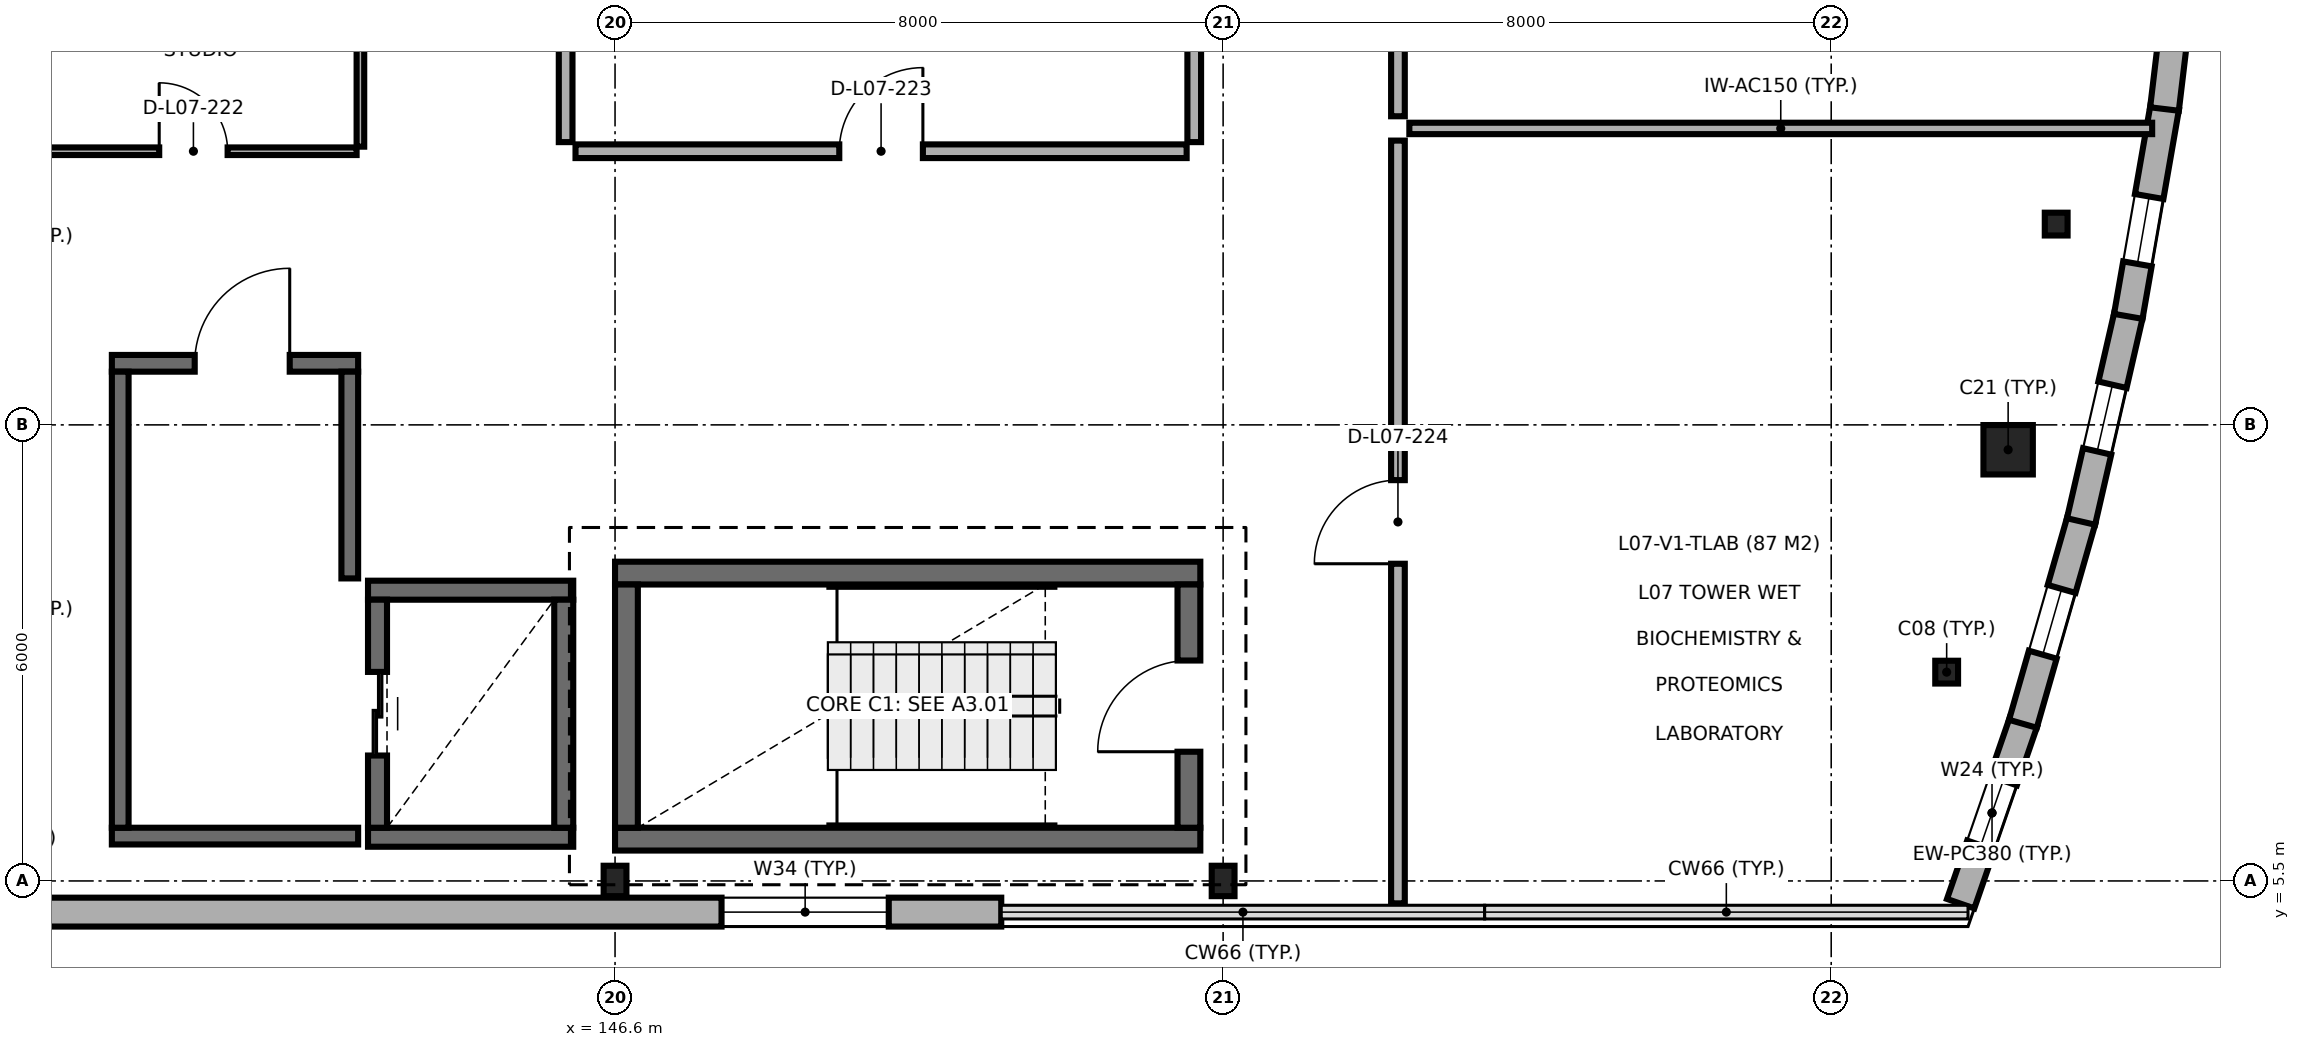
"""IFC4 building model, lengths in metres.
Left out: names, types, materials, properties, quantities, classifications, styles, units other than length and angle.
Written with IfcOpenShell. Run it as: python <this file> out.ifc"""

import sys

from ifc_helpers import new_model, si_unit, direction, frame, frame_2d, origin, origin_2d, place, context, subcontext, project, spatial, rectangle, circle, i_section, extrude, element, fill, save


model = new_model("IFC4")
c1 = context("Model", 3, precision=1e-05, world=origin(), true_north=direction((0.0, 1.0)))
c2 = subcontext(c1, "Body", "Model", "MODEL_VIEW")
j1 = project(units=[si_unit("LENGTHUNIT", "METRE"), si_unit("PLANEANGLEUNIT", "RADIAN")], contexts=[c1])
p1 = place(None, origin())
s1 = spatial("IfcSite", under=j1, at=p1, CompositionType="ELEMENT")
p2 = place(p1, origin())
s2 = spatial("IfcBuilding", under=s1, at=p2, CompositionType="ELEMENT")
p3 = place(p2, frame((0.0, 0.0, 30.6)))
s3 = spatial("IfcBuildingStorey", under=s2, at=p3, CompositionType="ELEMENT", Elevation=30.6)
for number, where, z_axis, x_axis in (
    (1, (146.6, 5.5, 0.0), (0.0, 0.0, 1.0), (1.0, 0.0, 0.0)),
    (2, (154.6, 5.5, 0.0), (0.0, 0.0, 1.0), (1.0, 0.0, 0.0)),
):
    element("IfcColumn", number, at=place(p3, frame(where, z_axis=z_axis, x_axis=x_axis)), inside=s3, PredefinedType="COLUMN", context=c2, shape_type="SweptSolid", body=[
        extrude(i_section(OverallWidth=0.3, OverallDepth=0.4, WebThickness=0.013, FlangeThickness=0.024, FilletRadius=0.027, at=origin_2d()), origin(), (0.0, 0.0, 1.0), 3.9),
    ])
p4 = place(p3, frame((164.119, 8.247, 0.0), z_axis=(0.0, 0.0, 1.0), x_axis=(1.0, 0.0, 0.0)))
e3 = element("IfcColumn", 3, at=p4, inside=s3, PredefinedType="COLUMN", context=c2, shape_type="SweptSolid", body=[
    extrude(i_section(OverallWidth=0.3, OverallDepth=0.3, WebThickness=0.011, FlangeThickness=0.019, FilletRadius=0.027, at=origin_2d()), origin(), (0.0, 0.0, 1.0), 3.9),
])
p5 = place(p3, frame((164.928, 11.173, 0.0), z_axis=(0.0, 0.0, 1.0), x_axis=(1.0, 0.0, 0.0)))
e4 = element("IfcColumn", 4, at=p5, inside=s3, PredefinedType="COLUMN", context=c2, shape_type="SweptSolid", body=[
    extrude(circle(Radius=0.325, at=origin_2d()), origin(), (0.0, 0.0, 1.0), 3.9),
])
p6 = place(p3, frame((165.56, 14.142, 0.0), z_axis=(0.0, 0.0, 1.0), x_axis=(1.0, 0.0, 0.0)))
e5 = element("IfcColumn", 5, at=p6, inside=s3, PredefinedType="COLUMN", context=c2, shape_type="SweptSolid", body=[
    extrude(i_section(OverallWidth=0.3, OverallDepth=0.3, WebThickness=0.011, FlangeThickness=0.019, FilletRadius=0.027, at=origin_2d()), origin(), (0.0, 0.0, 1.0), 3.9),
])
for number, where, z_axis, x_axis in (
    (6, (146.6, 6.05, 0.0), (0.0, 0.0, 1.0), (1.0, 0.0, 0.0)),
    (7, (154.3, 9.55, 0.0), (0.0, 0.0, 1.0), (-1.0, 0.0, 0.0)),
):
    element("IfcWall", number, at=place(p3, frame(where, z_axis=z_axis, x_axis=x_axis)), inside=s3, PredefinedType="SHEAR", context=c2, shape_type="SweptSolid", body=[
        extrude(rectangle(XDim=7.7, YDim=0.3, at=frame_2d((3.85, 0.0))), origin(), (0.0, 0.0, 1.0), 3.9),
    ])
p7 = place(p3, frame((146.75, 9.4, 0.0), z_axis=(0.0, 0.0, 1.0), x_axis=(0.0, -1.0, 0.0)))
e8 = element("IfcWall", 8, at=p7, inside=s3, PredefinedType="SHEAR", context=c2, shape_type="SweptSolid", body=[
    extrude(rectangle(XDim=3.2, YDim=0.3, at=frame_2d((1.6, 0.0))), origin(), (0.0, 0.0, 1.0), 3.9),
])
p8 = place(p3, frame((154.15, 6.2, 0.0), z_axis=(0.0, 0.0, 1.0), x_axis=(0.0, 1.0, 0.0)))
e9 = element("IfcWall", 9, at=p8, inside=s3, PredefinedType="SHEAR", context=c2, shape_type="SweptSolid", body=[
    extrude(rectangle(XDim=3.2, YDim=0.3, at=frame_2d((1.6, 0.0))), origin(), (0.0, 0.0, 1.0), 3.9),
])
p9 = place(p8, frame((1.0, 0.0, 0.0)))
e10 = element("IfcOpeningElement", 10, at=p9, cuts=e9, PredefinedType="OPENING", context=c2, shape_type="SweptSolid", body=[
    extrude(rectangle(XDim=1.2, YDim=2.15, at=frame_2d((0.6, 1.075))), frame((0.0, 0.16, 0.0), z_axis=(0.0, -1.0, 0.0), x_axis=(1.0, 0.0, 0.0)), (0.0, 0.0, 1.0), 0.32),
])
for number, where, z_axis, x_axis in (
    (11, (143.35, 6.075, 0.0), (0.0, 0.0, 1.0), (1.0, 0.0, 0.0)),
    (12, (146.05, 9.325, 0.0), (0.0, 0.0, 1.0), (-1.0, 0.0, 0.0)),
):
    element("IfcWall", number, at=place(p3, frame(where, z_axis=z_axis, x_axis=x_axis)), inside=s3, PredefinedType="SHEAR", context=c2, shape_type="SweptSolid", body=[
        extrude(rectangle(XDim=2.7, YDim=0.25, at=frame_2d((1.35, 0.0))), origin(), (0.0, 0.0, 1.0), 3.9),
    ])
p10 = place(p3, frame((143.475, 9.2, 0.0), z_axis=(0.0, 0.0, 1.0), x_axis=(0.0, -1.0, 0.0)))
e13 = element("IfcWall", 13, at=p10, inside=s3, PredefinedType="SHEAR", context=c2, shape_type="SweptSolid", body=[
    extrude(rectangle(XDim=3.0, YDim=0.25, at=frame_2d((1.5, 0.0))), origin(), (0.0, 0.0, 1.0), 3.9),
])
p11 = place(p10, frame((0.95, 0.0, 0.0)))
e14 = element("IfcOpeningElement", 14, at=p11, cuts=e13, PredefinedType="OPENING", context=c2, shape_type="SweptSolid", body=[
    extrude(rectangle(XDim=1.1, YDim=2.15, at=frame_2d((0.55, 1.075))), frame((0.0, 0.135, 0.0), z_axis=(0.0, -1.0, 0.0), x_axis=(1.0, 0.0, 0.0)), (0.0, 0.0, 1.0), 0.27),
])
p12 = place(p3, frame((145.925, 6.2, 0.0), z_axis=(0.0, 0.0, 1.0), x_axis=(0.0, 1.0, 0.0)))
e15 = element("IfcWall", 15, at=p12, inside=s3, PredefinedType="SHEAR", context=c2, shape_type="SweptSolid", body=[
    extrude(rectangle(XDim=3.0, YDim=0.25, at=frame_2d((1.5, 0.0))), origin(), (0.0, 0.0, 1.0), 3.9),
])
p13 = place(p3, frame((139.98, 6.09, 0.0), z_axis=(0.0, 0.0, 1.0), x_axis=(1.0, 0.0, 0.0)))
e16 = element("IfcWall", 16, at=p13, inside=s3, PredefinedType="SOLIDWALL", context=c2, shape_type="SweptSolid", body=[
    extrude(rectangle(XDim=3.24, YDim=0.22, at=frame_2d((1.62, 0.0))), origin(), (0.0, 0.0, 1.0), 3.7),
])
p14 = place(p3, frame((143.22, 12.31, 0.0), z_axis=(0.0, 0.0, 1.0), x_axis=(-1.0, 0.0, 0.0)))
e17 = element("IfcWall", 17, at=p14, inside=s3, PredefinedType="SOLIDWALL", context=c2, shape_type="SweptSolid", body=[
    extrude(rectangle(XDim=3.24, YDim=0.22, at=frame_2d((1.62, 0.0))), origin(), (0.0, 0.0, 1.0), 3.7),
])
p15 = place(p14, frame((0.9, 0.0, 0.0)))
e18 = element("IfcOpeningElement", 18, at=p15, cuts=e17, PredefinedType="OPENING", context=c2, shape_type="SweptSolid", body=[
    extrude(rectangle(XDim=1.25, YDim=2.15, at=frame_2d((0.625, 1.075))), frame((0.0, 0.12, 0.0), z_axis=(0.0, -1.0, 0.0), x_axis=(1.0, 0.0, 0.0)), (0.0, 0.0, 1.0), 0.24),
])
p16 = place(p3, frame((140.09, 12.2, 0.0), z_axis=(0.0, 0.0, 1.0), x_axis=(0.0, -1.0, 0.0)))
e19 = element("IfcWall", 19, at=p16, inside=s3, PredefinedType="SOLIDWALL", context=c2, shape_type="SweptSolid", body=[
    extrude(rectangle(XDim=6.0, YDim=0.22, at=frame_2d((3.0, 0.0))), origin(), (0.0, 0.0, 1.0), 3.7),
])
p17 = place(p3, frame((143.11, 9.48, 0.0), z_axis=(0.0, 0.0, 1.0), x_axis=(0.0, 1.0, 0.0)))
e20 = element("IfcWall", 20, at=p17, inside=s3, PredefinedType="SOLIDWALL", context=c2, shape_type="SweptSolid", body=[
    extrude(rectangle(XDim=2.72, YDim=0.22, at=frame_2d((1.36, 0.0))), origin(), (0.0, 0.0, 1.0), 3.7),
])
p18 = place(p3, frame((138.962, 5.09, 0.0), z_axis=(0.0, 0.0, 1.0), x_axis=(1.0, 0.0, 0.0)))
e21 = element("IfcWall", 21, at=p18, inside=s3, PredefinedType="SOLIDWALL", context=c2, shape_type="SweptSolid", body=[
    extrude(rectangle(XDim=12.719, YDim=0.38, at=frame_2d((6.359, 0.0))), origin(), (0.0, 0.0, 1.0), 3.7),
])
p19 = place(p18, frame((9.039, 0.0, 0.9)))
e22 = element("IfcOpeningElement", 22, at=p19, cuts=e21, PredefinedType="OPENING", context=c2, shape_type="SweptSolid", body=[
    extrude(rectangle(XDim=2.2, YDim=1.65, at=frame_2d((1.1, 0.825))), frame((0.0, 0.2, 0.0), z_axis=(0.0, -1.0, 0.0), x_axis=(1.0, 0.0, 0.0)), (0.0, 0.0, 1.0), 0.4),
])
p20 = place(p3, frame((164.303, 5.201, 0.0), z_axis=(0.0, 0.0, 1.0), x_axis=(0.3268184741, 0.945087130897, 0.0)))
e23 = element("IfcWall", 23, at=p20, inside=s3, PredefinedType="SOLIDWALL", context=c2, shape_type="SweptSolid", body=[
    extrude(rectangle(XDim=2.526, YDim=0.38, at=frame_2d((1.263, 0.0))), origin(), (0.0, 0.0, 1.0), 3.7),
])
p21 = place(p20, frame((0.813, 0.0, 0.9)))
e24 = element("IfcOpeningElement", 24, at=p21, cuts=e23, PredefinedType="OPENING", context=c2, shape_type="SweptSolid", body=[
    extrude(rectangle(XDim=0.9, YDim=1.8, at=frame_2d((0.45, 0.9))), frame((0.0, 0.2, 0.0), z_axis=(0.0, -1.0, 0.0), x_axis=(1.0, 0.0, 0.0)), (0.0, 0.0, 1.0), 0.4),
])
p22 = place(p3, frame((165.122, 7.567, 0.0), z_axis=(0.0, 0.0, 1.0), x_axis=(0.275772175055, 0.961223026912, 0.0)))
e25 = element("IfcWall", 25, at=p22, inside=s3, PredefinedType="SOLIDWALL", context=c2, shape_type="SweptSolid", body=[
    extrude(rectangle(XDim=2.791, YDim=0.38, at=frame_2d((1.396, 0.0))), origin(), (0.0, 0.0, 1.0), 3.7),
])
p23 = place(p22, frame((0.946, 0.0, 0.9)))
e26 = element("IfcOpeningElement", 26, at=p23, cuts=e25, PredefinedType="OPENING", context=c2, shape_type="SweptSolid", body=[
    extrude(rectangle(XDim=0.9, YDim=1.8, at=frame_2d((0.45, 0.9))), frame((0.0, 0.2, 0.0), z_axis=(0.0, -1.0, 0.0), x_axis=(1.0, 0.0, 0.0)), (0.0, 0.0, 1.0), 0.4),
])
p24 = place(p3, frame((165.887, 10.229, 0.0), z_axis=(0.0, 0.0, 1.0), x_axis=(0.224009786197, 0.974586894888, 0.0)))
e27 = element("IfcWall", 27, at=p24, inside=s3, PredefinedType="SOLIDWALL", context=c2, shape_type="SweptSolid", body=[
    extrude(rectangle(XDim=2.791, YDim=0.38, at=frame_2d((1.396, 0.0))), origin(), (0.0, 0.0, 1.0), 3.7),
])
p25 = place(p24, frame((0.946, 0.0, 0.9)))
e28 = element("IfcOpeningElement", 28, at=p25, cuts=e27, PredefinedType="OPENING", context=c2, shape_type="SweptSolid", body=[
    extrude(rectangle(XDim=0.9, YDim=1.8, at=frame_2d((0.45, 0.9))), frame((0.0, 0.2, 0.0), z_axis=(0.0, -1.0, 0.0), x_axis=(1.0, 0.0, 0.0)), (0.0, 0.0, 1.0), 0.4),
])
p26 = place(p3, frame((166.508, 12.927, 0.0), z_axis=(0.0, 0.0, 1.0), x_axis=(0.171699219546, 0.985149419128, 0.0)))
e29 = element("IfcWall", 29, at=p26, inside=s3, PredefinedType="SOLIDWALL", context=c2, shape_type="SweptSolid", body=[
    extrude(rectangle(XDim=2.791, YDim=0.38, at=frame_2d((1.396, 0.0))), origin(), (0.0, 0.0, 1.0), 3.7),
])
p27 = place(p26, frame((0.701, 0.0, 0.9)))
e30 = element("IfcOpeningElement", 30, at=p27, cuts=e29, PredefinedType="OPENING", context=c2, shape_type="SweptSolid", body=[
    extrude(rectangle(XDim=0.9, YDim=1.8, at=frame_2d((0.45, 0.9))), frame((0.0, 0.2, 0.0), z_axis=(0.0, -1.0, 0.0), x_axis=(1.0, 0.0, 0.0)), (0.0, 0.0, 1.0), 0.4),
])
p28 = place(p3, frame((166.985, 15.655, 0.0), z_axis=(0.0, 0.0, 1.0), x_axis=(0.118779618782, 0.992920642429, 0.0)))
e31 = element("IfcWall", 31, at=p28, inside=s3, PredefinedType="SOLIDWALL", context=c2, shape_type="SweptSolid", body=[
    extrude(rectangle(XDim=2.791, YDim=0.38, at=frame_2d((1.396, 0.0))), origin(), (0.0, 0.0, 1.0), 3.7),
])
p29 = place(p28, frame((0.946, 0.0, 0.9)))
e32 = element("IfcOpeningElement", 32, at=p29, cuts=e31, PredefinedType="OPENING", context=c2, shape_type="SweptSolid", body=[
    extrude(rectangle(XDim=0.9, YDim=1.8, at=frame_2d((0.45, 0.9))), frame((0.0, 0.2, 0.0), z_axis=(0.0, -1.0, 0.0), x_axis=(1.0, 0.0, 0.0)), (0.0, 0.0, 1.0), 0.4),
])
p30 = place(p3, frame((143.25, 15.16, 0.0), z_axis=(0.0, 0.0, 1.0), x_axis=(0.0, 1.0, 0.0)))
e33 = element("IfcWall", 33, at=p30, inside=s3, PredefinedType="PARTITIONING", context=c2, shape_type="SweptSolid", body=[
    extrude(rectangle(XDim=5.12, YDim=0.1, at=frame_2d((2.56, 0.0))), origin(), (0.0, 0.0, 1.0), 3.7),
])
p31 = place(p3, frame((138.905, 15.1, 0.0), z_axis=(0.0, 0.0, 1.0), x_axis=(1.0, 0.0, 0.0)))
e34 = element("IfcWall", 34, at=p31, inside=s3, PredefinedType="PARTITIONING", context=c2, shape_type="SweptSolid", body=[
    extrude(rectangle(XDim=4.295, YDim=0.1, at=frame_2d((2.147, 0.0))), origin(), (0.0, 0.0, 1.0), 3.7),
])
p32 = place(p31, frame((1.698, 0.0, 0.0)))
e35 = element("IfcOpeningElement", 35, at=p32, cuts=e34, PredefinedType="OPENING", context=c2, shape_type="SweptSolid", body=[
    extrude(rectangle(XDim=0.9, YDim=2.1, at=frame_2d((0.45, 1.05))), frame((0.0, 0.06, 0.0), z_axis=(0.0, -1.0, 0.0), x_axis=(1.0, 0.0, 0.0)), (0.0, 0.0, 1.0), 0.12),
])
for number, where, z_axis, x_axis in (
    (36, (145.95, 15.22, 0.0), (0.0, 0.0, 1.0), (0.0, 1.0, 0.0)),
    (37, (154.22, 15.22, 0.0), (0.0, 0.0, 1.0), (0.0, 1.0, 0.0)),
):
    element("IfcWall", number, at=place(p3, frame(where, z_axis=z_axis, x_axis=x_axis)), inside=s3, PredefinedType="PARTITIONING", context=c2, shape_type="SweptSolid", body=[
        extrude(rectangle(XDim=9.03, YDim=0.18, at=frame_2d((4.515, 0.0))), origin(), (0.0, 0.0, 1.0), 3.7),
    ])
p33 = place(p3, frame((146.08, 15.1, 0.0), z_axis=(0.0, 0.0, 1.0), x_axis=(1.0, 0.0, 0.0)))
e38 = element("IfcWall", 38, at=p33, inside=s3, PredefinedType="PARTITIONING", context=c2, shape_type="SweptSolid", body=[
    extrude(rectangle(XDim=8.04, YDim=0.18, at=frame_2d((4.02, 0.0))), origin(), (0.0, 0.0, 1.0), 3.7),
])
p34 = place(p33, frame((3.47, 0.0, 0.0)))
e39 = element("IfcOpeningElement", 39, at=p34, cuts=e38, PredefinedType="OPENING", context=c2, shape_type="SweptSolid", body=[
    extrude(rectangle(XDim=1.1, YDim=2.15, at=frame_2d((0.55, 1.075))), frame((0.0, 0.1, 0.0), z_axis=(0.0, -1.0, 0.0), x_axis=(1.0, 0.0, 0.0)), (0.0, 0.0, 1.0), 0.2),
])
p35 = place(p3, frame((157.05, 15.4, 0.0), z_axis=(0.0, 0.0, 1.0), x_axis=(1.0, 0.0, 0.0)))
e40 = element("IfcWall", 40, at=p35, inside=s3, PredefinedType="PARTITIONING", context=c2, shape_type="SweptSolid", body=[
    extrude(rectangle(XDim=9.772, YDim=0.15, at=frame_2d((4.886, 0.0))), origin(), (0.0, 0.0, 1.0), 3.2),
])
p36 = place(p3, frame((156.9, 5.205, 0.0), z_axis=(0.0, 0.0, 1.0), x_axis=(0.0, 1.0, 0.0)))
e41 = element("IfcWall", 41, at=p36, inside=s3, PredefinedType="PARTITIONING", context=c2, shape_type="SweptSolid", body=[
    extrude(rectangle(XDim=10.035, YDim=0.18, at=frame_2d((5.018, 0.0))), origin(), (0.0, 0.0, 1.0), 3.7),
])
p37 = place(p36, frame((4.468, 0.0, 0.0)))
e42 = element("IfcOpeningElement", 42, at=p37, cuts=e41, PredefinedType="OPENING", context=c2, shape_type="SweptSolid", body=[
    extrude(rectangle(XDim=1.1, YDim=2.15, at=frame_2d((0.55, 1.075))), frame((0.0, 0.1, 0.0), z_axis=(0.0, -1.0, 0.0), x_axis=(1.0, 0.0, 0.0)), (0.0, 0.0, 1.0), 0.2),
])
p38 = place(p3, frame((156.9, 15.56, 0.0), z_axis=(0.0, 0.0, 1.0), x_axis=(0.0, 1.0, 0.0)))
e43 = element("IfcWall", 43, at=p38, inside=s3, PredefinedType="PARTITIONING", context=c2, shape_type="SweptSolid", body=[
    extrude(rectangle(XDim=7.38, YDim=0.18, at=frame_2d((3.69, 0.0))), origin(), (0.0, 0.0, 1.0), 3.7),
])
p39 = place(p38, frame((3.19, 0.0, 0.0)))
e44 = element("IfcOpeningElement", 44, at=p39, cuts=e43, PredefinedType="OPENING", context=c2, shape_type="SweptSolid", body=[
    extrude(rectangle(XDim=1.0, YDim=2.15, at=frame_2d((0.5, 1.075))), frame((0.0, 0.1, 0.0), z_axis=(0.0, -1.0, 0.0), x_axis=(1.0, 0.0, 0.0)), (0.0, 0.0, 1.0), 0.2),
])
p40 = place(p9, origin())
e45 = element("IfcDoor", 45, at=p40, inside=s3, OperationType="SINGLE_SWING_LEFT", PredefinedType="DOOR", context=c2, shape_type="SweptSolid", body=[
    extrude(rectangle(XDim=1.2, YDim=2.15, at=frame_2d((0.6, 1.075))), frame((0.0, 0.025, 0.0), z_axis=(0.0, -1.0, 0.0), x_axis=(1.0, 0.0, 0.0)), (0.0, 0.0, 1.0), 0.05),
])
fill(e10, e45)
p41 = place(p11, origin())
e46 = element("IfcDoor", 46, at=p41, inside=s3, OperationType="DOUBLE_DOOR_SLIDING", PredefinedType="DOOR", context=c2, shape_type="SweptSolid", body=[
    extrude(rectangle(XDim=1.1, YDim=2.15, at=frame_2d((0.55, 1.075))), frame((0.0, 0.025, 0.0), z_axis=(0.0, -1.0, 0.0), x_axis=(1.0, 0.0, 0.0)), (0.0, 0.0, 1.0), 0.05),
])
fill(e14, e46)
p42 = place(p15, frame((1.25, 0.0, 0.0), z_axis=(0.0, 0.0, 1.0), x_axis=(-1.0, 0.0, 0.0)))
e47 = element("IfcDoor", 47, at=p42, inside=s3, OperationType="SINGLE_SWING_LEFT", PredefinedType="DOOR", context=c2, shape_type="SweptSolid", body=[
    extrude(rectangle(XDim=1.25, YDim=2.15, at=frame_2d((0.625, 1.075))), frame((0.0, 0.025, 0.0), z_axis=(0.0, -1.0, 0.0), x_axis=(1.0, 0.0, 0.0)), (0.0, 0.0, 1.0), 0.05),
])
fill(e18, e47)
p43 = place(p19, origin())
e48 = element("IfcWindow", 48, at=p43, inside=s3, PartitioningType="SINGLE_PANEL", PredefinedType="WINDOW", context=c2, shape_type="SweptSolid", body=[
    extrude(rectangle(XDim=2.2, YDim=1.65, at=frame_2d((1.1, 0.825))), frame((0.0, 0.03, 0.0), z_axis=(0.0, -1.0, 0.0), x_axis=(1.0, 0.0, 0.0)), (0.0, 0.0, 1.0), 0.06),
])
fill(e22, e48)
p44 = place(p21, origin())
e49 = element("IfcWindow", 49, at=p44, inside=s3, PartitioningType="SINGLE_PANEL", PredefinedType="WINDOW", context=c2, shape_type="SweptSolid", body=[
    extrude(rectangle(XDim=0.9, YDim=1.8, at=frame_2d((0.45, 0.9))), frame((0.0, 0.03, 0.0), z_axis=(0.0, -1.0, 0.0), x_axis=(1.0, 0.0, 0.0)), (0.0, 0.0, 1.0), 0.06),
])
fill(e24, e49)
p45 = place(p23, origin())
e50 = element("IfcWindow", 50, at=p45, inside=s3, PartitioningType="SINGLE_PANEL", PredefinedType="WINDOW", context=c2, shape_type="SweptSolid", body=[
    extrude(rectangle(XDim=0.9, YDim=1.8, at=frame_2d((0.45, 0.9))), frame((0.0, 0.03, 0.0), z_axis=(0.0, -1.0, 0.0), x_axis=(1.0, 0.0, 0.0)), (0.0, 0.0, 1.0), 0.06),
])
fill(e26, e50)
p46 = place(p25, origin())
e51 = element("IfcWindow", 51, at=p46, inside=s3, PartitioningType="SINGLE_PANEL", PredefinedType="WINDOW", context=c2, shape_type="SweptSolid", body=[
    extrude(rectangle(XDim=0.9, YDim=1.8, at=frame_2d((0.45, 0.9))), frame((0.0, 0.03, 0.0), z_axis=(0.0, -1.0, 0.0), x_axis=(1.0, 0.0, 0.0)), (0.0, 0.0, 1.0), 0.06),
])
fill(e28, e51)
p47 = place(p27, origin())
e52 = element("IfcWindow", 52, at=p47, inside=s3, PartitioningType="SINGLE_PANEL", PredefinedType="WINDOW", context=c2, shape_type="SweptSolid", body=[
    extrude(rectangle(XDim=0.9, YDim=1.8, at=frame_2d((0.45, 0.9))), frame((0.0, 0.03, 0.0), z_axis=(0.0, -1.0, 0.0), x_axis=(1.0, 0.0, 0.0)), (0.0, 0.0, 1.0), 0.06),
])
fill(e30, e52)
p48 = place(p32, origin())
e53 = element("IfcDoor", 53, at=p48, inside=s3, OperationType="SINGLE_SWING_LEFT", PredefinedType="DOOR", context=c2, shape_type="SweptSolid", body=[
    extrude(rectangle(XDim=0.9, YDim=2.1, at=frame_2d((0.45, 1.05))), frame((0.0, 0.025, 0.0), z_axis=(0.0, -1.0, 0.0), x_axis=(1.0, 0.0, 0.0)), (0.0, 0.0, 1.0), 0.05),
])
fill(e35, e53)
p49 = place(p34, origin())
e54 = element("IfcDoor", 54, at=p49, inside=s3, OperationType="SINGLE_SWING_RIGHT", PredefinedType="DOOR", context=c2, shape_type="SweptSolid", body=[
    extrude(rectangle(XDim=1.1, YDim=2.15, at=frame_2d((0.55, 1.075))), frame((0.0, 0.025, 0.0), z_axis=(0.0, -1.0, 0.0), x_axis=(1.0, 0.0, 0.0)), (0.0, 0.0, 1.0), 0.05),
])
fill(e39, e54)
p50 = place(p37, origin())
e55 = element("IfcDoor", 55, at=p50, inside=s3, OperationType="SINGLE_SWING_LEFT", PredefinedType="DOOR", context=c2, shape_type="SweptSolid", body=[
    extrude(rectangle(XDim=1.1, YDim=2.15, at=frame_2d((0.55, 1.075))), frame((0.0, 0.025, 0.0), z_axis=(0.0, -1.0, 0.0), x_axis=(1.0, 0.0, 0.0)), (0.0, 0.0, 1.0), 0.05),
])
fill(e42, e55)
save(model, sys.argv[1])
